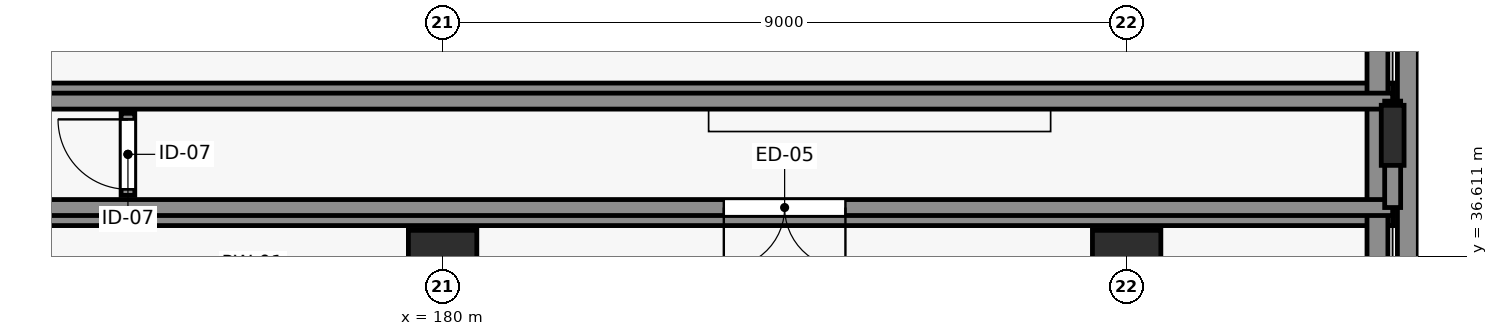
"""IFC4 building model, lengths in metres.
Left out: names, types, materials, properties, quantities, classifications, styles, units other than length and angle.
Written with IfcOpenShell. Run it as: python <this file> out.ifc"""

import sys

from ifc_helpers import new_model, si_unit, direction, frame, frame_2d, origin, origin_2d, place, context, subcontext, project, spatial, rectangle, i_section, extrude, element, fill, save


model = new_model("IFC4")
c1 = context("Model", 3, precision=1e-05, world=origin(), true_north=direction((0.0, 1.0)))
c2 = subcontext(c1, "Body", "Model", "MODEL_VIEW")
j1 = project(units=[si_unit("LENGTHUNIT", "METRE"), si_unit("PLANEANGLEUNIT", "RADIAN")], contexts=[c1])
p1 = place(None, origin())
s1 = spatial("IfcSite", under=j1, at=p1, CompositionType="ELEMENT")
p2 = place(p1, origin())
s2 = spatial("IfcBuilding", under=s1, at=p2, CompositionType="ELEMENT")
p3 = place(p2, origin())
s3 = spatial("IfcBuildingStorey", under=s2, at=p3, CompositionType="ELEMENT", Elevation=0.0)
for number, where, z_axis, x_axis in (
    (1, (141.5, 37.15, 0.0), (0.0, 0.0, 1.0), (1.0, 0.0, 0.0)),
    (2, (141.5, 38.75, 0.0), (0.0, 0.0, 1.0), (1.0, 0.0, 0.0)),
):
    element("IfcWall", number, at=place(p3, frame(where, z_axis=z_axis, x_axis=x_axis)), inside=s3, PredefinedType="SOLIDWALL", context=c2, shape_type="SweptSolid", body=[
        extrude(rectangle(XDim=51.0, YDim=0.275, at=frame_2d((25.5, 0.0))), origin(), (0.0, 0.0, 1.0), 0.675),
    ])
for number, where, z_axis, x_axis in (
    (3, (192.3, 36.15, 0.0), (0.0, 0.0, 1.0), (0.0, 1.0, 0.0)),
    (4, (192.7, 36.15, 0.0), (0.0, 0.0, 1.0), (0.0, 1.0, 0.0)),
):
    element("IfcWall", number, at=place(p3, frame(where, z_axis=z_axis, x_axis=x_axis)), inside=s3, PredefinedType="SOLIDWALL", context=c2, shape_type="SweptSolid", body=[
        extrude(rectangle(XDim=3.6, YDim=0.275, at=frame_2d((1.8, 0.0))), origin(), (0.0, 0.0, 1.0), 0.675),
    ])
for number, where, z_axis, x_axis in (
    (5, (180.0, 36.5, 0.0), (0.0, 0.0, 1.0), (1.0, 0.0, 0.0)),
    (6, (189.0, 36.5, 0.0), (0.0, 0.0, 1.0), (1.0, 0.0, 0.0)),
):
    element("IfcColumn", number, at=place(p3, frame(where, z_axis=z_axis, x_axis=x_axis)), inside=s3, PredefinedType="COLUMN", context=c2, shape_type="SweptSolid", body=[
        extrude(rectangle(XDim=0.9, YDim=0.9, at=origin_2d()), origin(), (0.0, 0.0, 1.0), 4.8),
    ])
p4 = place(p3, frame((192.5, 38.2, 0.2), z_axis=(0.0, 0.0, 1.0), x_axis=(1.0, 0.0, 0.0)))
e7 = element("IfcColumn", 7, at=p4, inside=s3, PredefinedType="COLUMN", context=c2, shape_type="SweptSolid", body=[
    extrude(i_section(OverallWidth=0.3, OverallDepth=0.79, WebThickness=0.015, FlangeThickness=0.028, FilletRadius=0.03, at=origin_2d()), origin(), (0.0, 0.0, 1.0), 4.25),
])
p5 = place(p3, frame((192.5, 37.25, 0.915), z_axis=(0.0, 0.0, 1.0), x_axis=(-1.0, 0.0, 0.0)))
e8 = element("IfcWall", 8, at=p5, inside=s3, PredefinedType="SOLIDWALL", context=c2, shape_type="SweptSolid", body=[
    extrude(rectangle(XDim=51.0, YDim=0.21, at=frame_2d((25.5, 0.0))), origin(), (0.0, 0.0, 1.0), 3.185),
])
p6 = place(p5, frame((25.2, 0.0, 0.0)))
e9 = element("IfcOpeningElement", 9, at=p6, cuts=e8, PredefinedType="OPENING", context=c2, shape_type="SweptSolid", body=[
    extrude(rectangle(XDim=1.6, YDim=2.3, at=frame_2d((0.8, 1.15))), frame((0.0, 0.115, 0.0), z_axis=(0.0, -1.0, 0.0), x_axis=(1.0, 0.0, 0.0)), (0.0, 0.0, 1.0), 0.23),
])
p7 = place(p5, frame((7.2, 0.0, 0.0)))
e10 = element("IfcOpeningElement", 10, at=p7, cuts=e8, PredefinedType="OPENING", context=c2, shape_type="SweptSolid", body=[
    extrude(rectangle(XDim=1.6, YDim=2.3, at=frame_2d((0.8, 1.15))), frame((0.0, 0.115, 0.0), z_axis=(0.0, -1.0, 0.0), x_axis=(1.0, 0.0, 0.0)), (0.0, 0.0, 1.0), 0.23),
])
p8 = place(p5, frame((36.0, 0.0, 0.9)))
e11 = element("IfcOpeningElement", 11, at=p8, cuts=e8, PredefinedType="OPENING", context=c2, shape_type="SweptSolid", body=[
    extrude(rectangle(XDim=4.2, YDim=1.5, at=frame_2d((2.1, 0.75))), frame((0.0, 0.115, 0.0), z_axis=(0.0, -1.0, 0.0), x_axis=(1.0, 0.0, 0.0)), (0.0, 0.0, 1.0), 0.23),
])
p9 = place(p3, frame((141.5, 38.65, 0.915), z_axis=(0.0, 0.0, 1.0), x_axis=(1.0, 0.0, 0.0)))
e12 = element("IfcWall", 12, at=p9, inside=s3, PredefinedType="SOLIDWALL", context=c2, shape_type="SweptSolid", body=[
    extrude(rectangle(XDim=51.0, YDim=0.21, at=frame_2d((25.5, 0.0))), origin(), (0.0, 0.0, 1.0), 3.185),
])
p10 = place(p9, frame((15.2, 0.0, 0.0)))
e13 = element("IfcOpeningElement", 13, at=p10, cuts=e12, PredefinedType="OPENING", context=c2, shape_type="SweptSolid", body=[
    extrude(rectangle(XDim=1.6, YDim=2.3, at=frame_2d((0.8, 1.15))), frame((0.0, 0.115, 0.0), z_axis=(0.0, -1.0, 0.0), x_axis=(1.0, 0.0, 0.0)), (0.0, 0.0, 1.0), 0.23),
])
p11 = place(p9, frame((24.0, 0.0, 0.9)))
e14 = element("IfcOpeningElement", 14, at=p11, cuts=e12, PredefinedType="OPENING", context=c2, shape_type="SweptSolid", body=[
    extrude(rectangle(XDim=4.2, YDim=1.5, at=frame_2d((2.1, 0.75))), frame((0.0, 0.115, 0.0), z_axis=(0.0, -1.0, 0.0), x_axis=(1.0, 0.0, 0.0)), (0.0, 0.0, 1.0), 0.23),
])
p12 = place(p3, frame((192.5, 38.65, 0.915), z_axis=(0.0, 0.0, 1.0), x_axis=(0.0, -1.0, 0.0)))
e15 = element("IfcWall", 15, at=p12, inside=s3, PredefinedType="SOLIDWALL", context=c2, shape_type="SweptSolid", body=[
    extrude(rectangle(XDim=1.4, YDim=0.21, at=frame_2d((0.7, 0.0))), origin(), (0.0, 0.0, 1.0), 3.185),
])
p13 = place(p3, frame((175.86, 37.41, 0.915), z_axis=(0.0, 0.0, 1.0), x_axis=(0.0, 1.0, 0.0)))
e16 = element("IfcWall", 16, at=p13, inside=s3, PredefinedType="PARTITIONING", context=c2, shape_type="SweptSolid", body=[
    extrude(rectangle(XDim=1.08, YDim=0.18, at=frame_2d((0.54, 0.0))), origin(), (0.0, 0.0, 1.0), 3.435),
])
p14 = place(p13, frame((0.08, 0.0, 0.0)))
e17 = element("IfcOpeningElement", 17, at=p14, cuts=e16, PredefinedType="OPENING", context=c2, shape_type="SweptSolid", body=[
    extrude(rectangle(XDim=0.92, YDim=2.1, at=frame_2d((0.46, 1.05))), frame((0.0, 0.1, 0.0), z_axis=(0.0, -1.0, 0.0), x_axis=(1.0, 0.0, 0.0)), (0.0, 0.0, 1.0), 0.2),
])
p15 = place(p7, origin())
e18 = element("IfcDoor", 18, at=p15, inside=s3, OperationType="DOUBLE_DOOR_SINGLE_SWING", PredefinedType="DOOR", context=c2, shape_type="SweptSolid", body=[
    extrude(rectangle(XDim=1.6, YDim=2.3, at=frame_2d((0.8, 1.15))), frame((0.0, 0.025, 0.0), z_axis=(0.0, -1.0, 0.0), x_axis=(1.0, 0.0, 0.0)), (0.0, 0.0, 1.0), 0.05),
])
fill(e10, e18)
p16 = place(p14, origin())
e19 = element("IfcDoor", 19, at=p16, inside=s3, OperationType="SINGLE_SWING_RIGHT", PredefinedType="DOOR", context=c2, shape_type="SweptSolid", body=[
    extrude(rectangle(XDim=0.92, YDim=2.1, at=frame_2d((0.46, 1.05))), frame((0.0, 0.025, 0.0), z_axis=(0.0, -1.0, 0.0), x_axis=(1.0, 0.0, 0.0)), (0.0, 0.0, 1.0), 0.05),
])
fill(e17, e19)
save(model, sys.argv[1])
